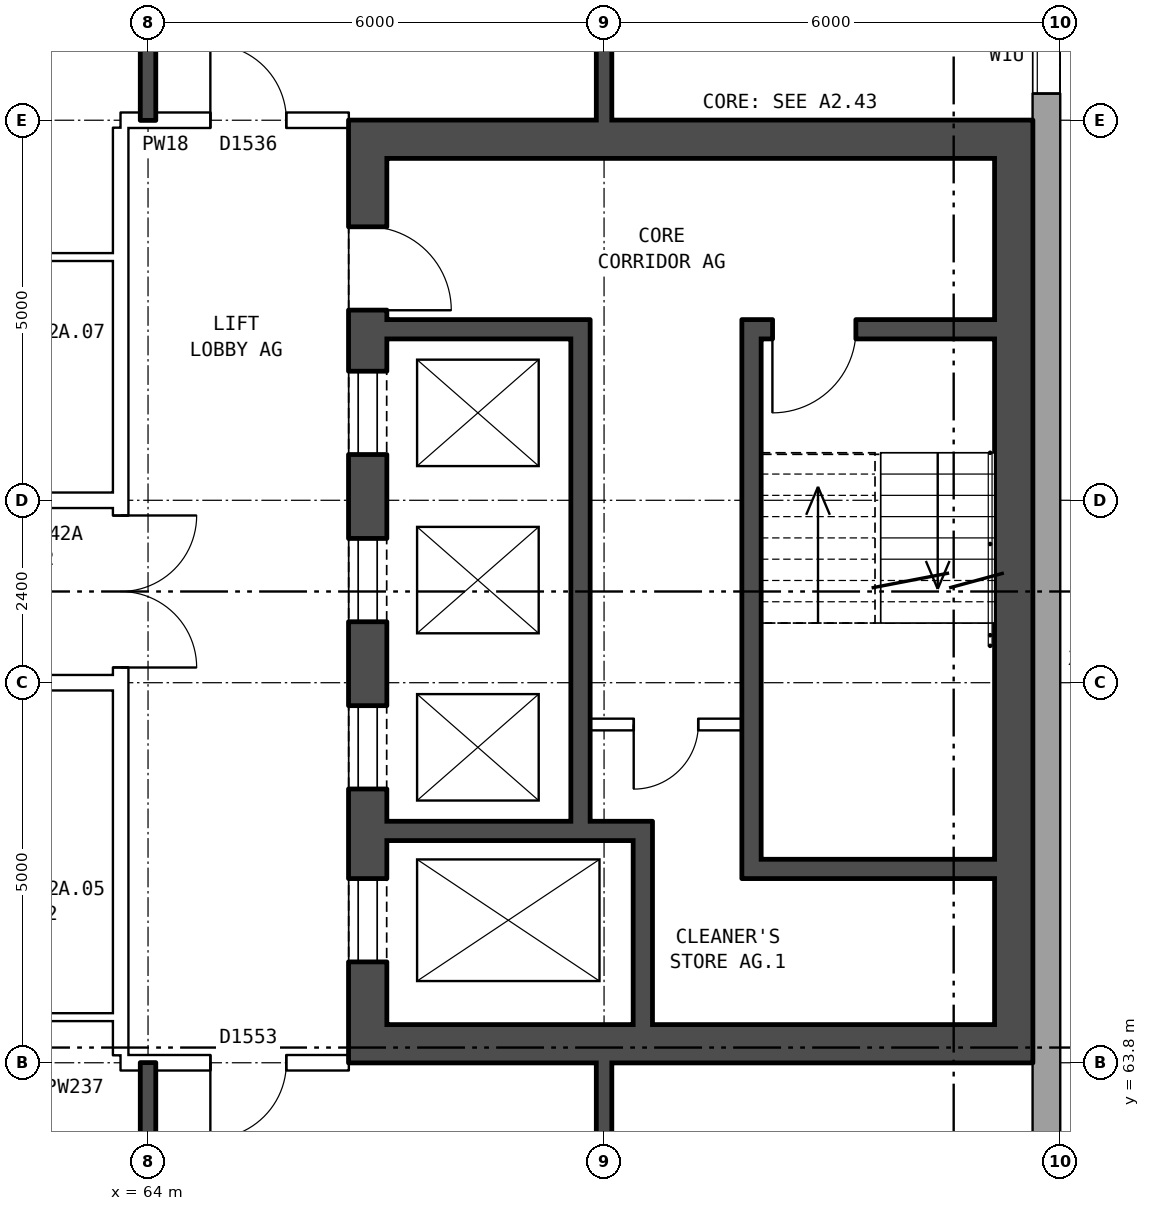
"""IFC4 building model, lengths in metres.
Left out: names, types, materials, properties, quantities, classifications, styles, units other than length and angle.
Written with IfcOpenShell. Run it as: python <this file> out.ifc"""

import sys

from ifc_helpers import new_model, si_unit, direction, frame, frame_2d, origin, place, context, subcontext, project, spatial, rectangle, extrude, element, fill, save


model = new_model("IFC4")
c1 = context("Model", 3, precision=1e-05, world=origin(), true_north=direction((0.0, 1.0)))
c2 = subcontext(c1, "Body", "Model", "MODEL_VIEW")
j1 = project(units=[si_unit("LENGTHUNIT", "METRE"), si_unit("PLANEANGLEUNIT", "RADIAN")], contexts=[c1])
p1 = place(None, origin())
s1 = spatial("IfcSite", under=j1, at=p1, CompositionType="ELEMENT")
p2 = place(p1, origin())
s2 = spatial("IfcBuilding", under=s1, at=p2, CompositionType="ELEMENT")
p3 = place(p2, frame((0.0, 0.0, 151.6)))
s3 = spatial("IfcBuildingStorey", under=s2, at=p3, CompositionType="ELEMENT", Elevation=151.6)
p4 = place(p3, frame((75.82, 57.075, 0.0), z_axis=(0.0, 0.0, 1.0), x_axis=(0.0, 1.0, 0.0)))
e1 = element("IfcWall", 1, at=p4, inside=s3, PredefinedType="STANDARD", context=c2, shape_type="SweptSolid", body=[
    extrude(rectangle(XDim=25.851, YDim=0.36, at=frame_2d((12.925, 0.0))), origin(), (0.0, 0.0, 1.0), 2.85),
])
p5 = place(p4, frame((1.625, 0.0, 0.8)))
e2 = element("IfcOpeningElement", 2, at=p5, cuts=e1, PredefinedType="OPENING", context=c2, shape_type="SweptSolid", body=[
    extrude(rectangle(XDim=1.6, YDim=1.8, at=frame_2d((0.8, 0.9))), frame((0.0, 0.19, 0.0), z_axis=(0.0, -1.0, 0.0), x_axis=(1.0, 0.0, 0.0)), (0.0, 0.0, 1.0), 0.38),
])
p6 = place(p4, frame((3.525, 0.0, 1.7)))
e3 = element("IfcOpeningElement", 3, at=p6, cuts=e1, PredefinedType="OPENING", context=c2, shape_type="SweptSolid", body=[
    extrude(rectangle(XDim=1.6, YDim=0.9, at=frame_2d((0.8, 0.45))), frame((0.0, 0.19, 0.0), z_axis=(0.0, -1.0, 0.0), x_axis=(1.0, 0.0, 0.0)), (0.0, 0.0, 1.0), 0.38),
])
p7 = place(p4, frame((19.475, 0.0, 0.35)))
e4 = element("IfcOpeningElement", 4, at=p7, cuts=e1, PredefinedType="OPENING", context=c2, shape_type="SweptSolid", body=[
    extrude(rectangle(XDim=1.0, YDim=0.9, at=frame_2d((0.5, 0.45))), frame((0.0, 0.19, 0.0), z_axis=(0.0, -1.0, 0.0), x_axis=(1.0, 0.0, 0.0)), (0.0, 0.0, 1.0), 0.38),
])
p8 = place(p4, frame((22.625, 0.0, 0.8)))
e5 = element("IfcOpeningElement", 5, at=p8, cuts=e1, PredefinedType="OPENING", context=c2, shape_type="SweptSolid", body=[
    extrude(rectangle(XDim=1.6, YDim=1.8, at=frame_2d((0.8, 0.9))), frame((0.0, 0.19, 0.0), z_axis=(0.0, -1.0, 0.0), x_axis=(1.0, 0.0, 0.0)), (0.0, 0.0, 1.0), 0.38),
])
p9 = place(p4, frame((20.825, 0.0, 1.65)))
e6 = element("IfcOpeningElement", 6, at=p9, cuts=e1, PredefinedType="OPENING", context=c2, shape_type="SweptSolid", body=[
    extrude(rectangle(XDim=0.8, YDim=0.9, at=frame_2d((0.4, 0.45))), frame((0.0, 0.19, 0.0), z_axis=(0.0, -1.0, 0.0), x_axis=(1.0, 0.0, 0.0)), (0.0, 0.0, 1.0), 0.38),
])
p10 = place(p3, frame((66.89, 63.8, 0.0), z_axis=(0.0, 0.0, 1.0), x_axis=(0.0, 1.0, 0.0)))
e7 = element("IfcWall", 7, at=p10, inside=s3, PredefinedType="SHEAR", context=c2, shape_type="SweptSolid", body=[
    extrude(rectangle(XDim=12.4, YDim=0.5, at=frame_2d((6.2, 0.0))), origin(), (0.0, 0.0, 1.0), 2.85),
])
p11 = place(p10, frame((1.325, 0.0, 0.0)))
e8 = element("IfcOpeningElement", 8, at=p11, cuts=e7, PredefinedType="OPENING", context=c2, shape_type="SweptSolid", body=[
    extrude(rectangle(XDim=1.1, YDim=2.1, at=frame_2d((0.55, 1.05))), frame((0.0, 0.26, 0.0), z_axis=(0.0, -1.0, 0.0), x_axis=(1.0, 0.0, 0.0)), (0.0, 0.0, 1.0), 0.52),
])
p12 = place(p10, frame((3.6, 0.0, 0.0)))
e9 = element("IfcOpeningElement", 9, at=p12, cuts=e7, PredefinedType="OPENING", context=c2, shape_type="SweptSolid", body=[
    extrude(rectangle(XDim=1.1, YDim=2.1, at=frame_2d((0.55, 1.05))), frame((0.0, 0.26, 0.0), z_axis=(0.0, -1.0, 0.0), x_axis=(1.0, 0.0, 0.0)), (0.0, 0.0, 1.0), 0.52),
])
p13 = place(p10, frame((5.8, 0.0, 0.0)))
e10 = element("IfcOpeningElement", 10, at=p13, cuts=e7, PredefinedType="OPENING", context=c2, shape_type="SweptSolid", body=[
    extrude(rectangle(XDim=1.1, YDim=2.1, at=frame_2d((0.55, 1.05))), frame((0.0, 0.26, 0.0), z_axis=(0.0, -1.0, 0.0), x_axis=(1.0, 0.0, 0.0)), (0.0, 0.0, 1.0), 0.52),
])
p14 = place(p10, frame((8.0, 0.0, 0.0)))
e11 = element("IfcOpeningElement", 11, at=p14, cuts=e7, PredefinedType="OPENING", context=c2, shape_type="SweptSolid", body=[
    extrude(rectangle(XDim=1.1, YDim=2.1, at=frame_2d((0.55, 1.05))), frame((0.0, 0.26, 0.0), z_axis=(0.0, -1.0, 0.0), x_axis=(1.0, 0.0, 0.0)), (0.0, 0.0, 1.0), 0.52),
])
p15 = place(p10, frame((9.9, 0.0, 0.0)))
e12 = element("IfcOpeningElement", 12, at=p15, cuts=e7, PredefinedType="OPENING", context=c2, shape_type="SweptSolid", body=[
    extrude(rectangle(XDim=1.1, YDim=2.1, at=frame_2d((0.55, 1.05))), frame((0.0, 0.26, 0.0), z_axis=(0.0, -1.0, 0.0), x_axis=(1.0, 0.0, 0.0)), (0.0, 0.0, 1.0), 0.52),
])
p16 = place(p3, frame((75.39, 63.8, 0.0), z_axis=(0.0, 0.0, 1.0), x_axis=(0.0, 1.0, 0.0)))
e13 = element("IfcWall", 13, at=p16, inside=s3, PredefinedType="SHEAR", context=c2, shape_type="SweptSolid", body=[
    extrude(rectangle(XDim=12.4, YDim=0.5, at=frame_2d((6.2, 0.0))), origin(), (0.0, 0.0, 1.0), 2.85),
])
for number, where, z_axis, x_axis in (
    (14, (67.14, 64.05, 0.0), (0.0, 0.0, 1.0), (1.0, 0.0, 0.0)),
    (15, (67.14, 75.95, 0.0), (0.0, 0.0, 1.0), (1.0, 0.0, 0.0)),
):
    element("IfcWall", number, at=place(p3, frame(where, z_axis=z_axis, x_axis=x_axis)), inside=s3, PredefinedType="SHEAR", context=c2, shape_type="SweptSolid", body=[
        extrude(rectangle(XDim=8.0, YDim=0.5, at=frame_2d((4.0, 0.0))), origin(), (0.0, 0.0, 1.0), 2.85),
    ])
p17 = place(p3, frame((72.065, 66.35, 0.0), z_axis=(0.0, 0.0, 1.0), x_axis=(1.0, 0.0, 0.0)))
e16 = element("IfcWall", 16, at=p17, inside=s3, PredefinedType="SHEAR", context=c2, shape_type="SweptSolid", body=[
    extrude(rectangle(XDim=3.075, YDim=0.25, at=frame_2d((1.538, 0.0))), origin(), (0.0, 0.0, 1.0), 2.85),
])
p18 = place(p3, frame((67.14, 66.85, 0.0), z_axis=(0.0, 0.0, 1.0), x_axis=(1.0, 0.0, 0.0)))
e17 = element("IfcWall", 17, at=p18, inside=s3, PredefinedType="SHEAR", context=c2, shape_type="SweptSolid", body=[
    extrude(rectangle(XDim=3.495, YDim=0.25, at=frame_2d((1.748, 0.0))), origin(), (0.0, 0.0, 1.0), 2.85),
])
p19 = place(p3, frame((69.815, 68.25, 0.0), z_axis=(0.0, 0.0, 1.0), x_axis=(1.0, 0.0, 0.0)))
e18 = element("IfcWall", 18, at=p19, inside=s3, PredefinedType="PARTITIONING", context=c2, shape_type="SweptSolid", body=[
    extrude(rectangle(XDim=2.0, YDim=0.15, at=frame_2d((1.0, 0.0))), origin(), (0.0, 0.0, 1.0), 2.85),
])
p20 = place(p19, frame((0.575, 0.0, 0.0)))
e19 = element("IfcOpeningElement", 19, at=p20, cuts=e18, PredefinedType="OPENING", context=c2, shape_type="SweptSolid", body=[
    extrude(rectangle(XDim=0.85, YDim=2.1, at=frame_2d((0.425, 1.05))), frame((0.0, 0.085, 0.0), z_axis=(0.0, -1.0, 0.0), x_axis=(1.0, 0.0, 0.0)), (0.0, 0.0, 1.0), 0.17),
])
p21 = place(p3, frame((67.14, 73.45, 0.0), z_axis=(0.0, 0.0, 1.0), x_axis=(1.0, 0.0, 0.0)))
e20 = element("IfcWall", 20, at=p21, inside=s3, PredefinedType="SHEAR", context=c2, shape_type="SweptSolid", body=[
    extrude(rectangle(XDim=2.425, YDim=0.25, at=frame_2d((1.212, 0.0))), origin(), (0.0, 0.0, 1.0), 2.85),
])
p22 = place(p3, frame((72.065, 73.45, 0.0), z_axis=(0.0, 0.0, 1.0), x_axis=(1.0, 0.0, 0.0)))
e21 = element("IfcWall", 21, at=p22, inside=s3, PredefinedType="SHEAR", context=c2, shape_type="SweptSolid", body=[
    extrude(rectangle(XDim=3.075, YDim=0.25, at=frame_2d((1.538, 0.0))), origin(), (0.0, 0.0, 1.0), 2.85),
])
p23 = place(p22, frame((0.15, 0.0, 0.0)))
e22 = element("IfcOpeningElement", 22, at=p23, cuts=e21, PredefinedType="OPENING", context=c2, shape_type="SweptSolid", body=[
    extrude(rectangle(XDim=1.1, YDim=2.1, at=frame_2d((0.55, 1.05))), frame((0.0, 0.135, 0.0), z_axis=(0.0, -1.0, 0.0), x_axis=(1.0, 0.0, 0.0)), (0.0, 0.0, 1.0), 0.27),
])
p24 = place(p3, frame((69.69, 66.975, 0.0), z_axis=(0.0, 0.0, 1.0), x_axis=(0.0, 1.0, 0.0)))
e23 = element("IfcWall", 23, at=p24, inside=s3, PredefinedType="SHEAR", context=c2, shape_type="SweptSolid", body=[
    extrude(rectangle(XDim=6.6, YDim=0.25, at=frame_2d((3.3, 0.0))), origin(), (0.0, 0.0, 1.0), 2.85),
])
p25 = place(p3, frame((70.51, 64.3, 0.0), z_axis=(0.0, 0.0, 1.0), x_axis=(0.0, 1.0, 0.0)))
e24 = element("IfcWall", 24, at=p25, inside=s3, PredefinedType="SHEAR", context=c2, shape_type="SweptSolid", body=[
    extrude(rectangle(XDim=2.425, YDim=0.25, at=frame_2d((1.212, 0.0))), origin(), (0.0, 0.0, 1.0), 2.85),
])
p26 = place(p3, frame((71.94, 66.225, 0.0), z_axis=(0.0, 0.0, 1.0), x_axis=(0.0, 1.0, 0.0)))
e25 = element("IfcWall", 25, at=p26, inside=s3, PredefinedType="SHEAR", context=c2, shape_type="SweptSolid", body=[
    extrude(rectangle(XDim=7.35, YDim=0.25, at=frame_2d((3.675, 0.0))), origin(), (0.0, 0.0, 1.0), 2.85),
])
p27 = place(p3, frame((63.64, 63.9, 0.0), z_axis=(0.0, 0.0, 1.0), x_axis=(0.0, 1.0, 0.0)))
e26 = element("IfcWall", 26, at=p27, inside=s3, PredefinedType="PARTITIONING", context=c2, shape_type="SweptSolid", body=[
    extrude(rectangle(XDim=12.2, YDim=0.2, at=frame_2d((6.1, 0.0))), origin(), (0.0, 0.0, 1.0), 2.85),
])
p28 = place(p27, frame((5.1, 0.0, 0.0)))
e27 = element("IfcOpeningElement", 27, at=p28, cuts=e26, PredefinedType="OPENING", context=c2, shape_type="SweptSolid", body=[
    extrude(rectangle(XDim=2.0, YDim=2.1, at=frame_2d((1.0, 1.05))), frame((0.0, 0.11, 0.0), z_axis=(0.0, -1.0, 0.0), x_axis=(1.0, 0.0, 0.0)), (0.0, 0.0, 1.0), 0.22),
])
p29 = place(p3, frame((63.64, 63.8, 0.0), z_axis=(0.0, 0.0, 1.0), x_axis=(1.0, 0.0, 0.0)))
e28 = element("IfcWall", 28, at=p29, inside=s3, PredefinedType="PARTITIONING", context=c2, shape_type="SweptSolid", body=[
    extrude(rectangle(XDim=3.0, YDim=0.2, at=frame_2d((1.5, 0.0))), origin(), (0.0, 0.0, 1.0), 2.85),
])
p30 = place(p29, frame((1.18, 0.0, 0.0)))
e29 = element("IfcOpeningElement", 29, at=p30, cuts=e28, PredefinedType="OPENING", context=c2, shape_type="SweptSolid", body=[
    extrude(rectangle(XDim=1.0, YDim=2.1, at=frame_2d((0.5, 1.05))), frame((0.0, 0.11, 0.0), z_axis=(0.0, -1.0, 0.0), x_axis=(1.0, 0.0, 0.0)), (0.0, 0.0, 1.0), 0.22),
])
p31 = place(p3, frame((61.0, 64.4, 0.0), z_axis=(0.0, 0.0, 1.0), x_axis=(1.0, 0.0, 0.0)))
e30 = element("IfcWall", 30, at=p31, inside=s3, PredefinedType="PARTITIONING", context=c2, shape_type="SweptSolid", body=[
    extrude(rectangle(XDim=2.64, YDim=0.1, at=frame_2d((1.32, 0.0))), origin(), (0.0, 0.0, 1.0), 2.85),
])
p32 = place(p3, frame((44.36, 68.8, 0.0), z_axis=(0.0, 0.0, 1.0), x_axis=(1.0, 0.0, 0.0)))
e31 = element("IfcWall", 31, at=p32, inside=s3, PredefinedType="PARTITIONING", context=c2, shape_type="SweptSolid", body=[
    extrude(rectangle(XDim=19.28, YDim=0.2, at=frame_2d((9.64, 0.0))), origin(), (0.0, 0.0, 1.0), 2.85),
])
p33 = place(p32, frame((14.64, 0.0, 0.0)))
e32 = element("IfcOpeningElement", 32, at=p33, cuts=e31, PredefinedType="OPENING", context=c2, shape_type="SweptSolid", body=[
    extrude(rectangle(XDim=1.0, YDim=2.1, at=frame_2d((0.5, 1.05))), frame((0.0, 0.11, 0.0), z_axis=(0.0, -1.0, 0.0), x_axis=(1.0, 0.0, 0.0)), (0.0, 0.0, 1.0), 0.22),
])
p34 = place(p32, frame((5.64, 0.0, 0.0)))
e33 = element("IfcOpeningElement", 33, at=p34, cuts=e31, PredefinedType="OPENING", context=c2, shape_type="SweptSolid", body=[
    extrude(rectangle(XDim=1.0, YDim=2.1, at=frame_2d((0.5, 1.05))), frame((0.0, 0.11, 0.0), z_axis=(0.0, -1.0, 0.0), x_axis=(1.0, 0.0, 0.0)), (0.0, 0.0, 1.0), 0.22),
])
p35 = place(p3, frame((44.36, 71.2, 0.0), z_axis=(0.0, 0.0, 1.0), x_axis=(1.0, 0.0, 0.0)))
e34 = element("IfcWall", 34, at=p35, inside=s3, PredefinedType="PARTITIONING", context=c2, shape_type="SweptSolid", body=[
    extrude(rectangle(XDim=19.28, YDim=0.2, at=frame_2d((9.64, 0.0))), origin(), (0.0, 0.0, 1.0), 2.85),
])
p36 = place(p35, frame((14.64, 0.0, 0.0)))
e35 = element("IfcOpeningElement", 35, at=p36, cuts=e34, PredefinedType="OPENING", context=c2, shape_type="SweptSolid", body=[
    extrude(rectangle(XDim=1.0, YDim=2.1, at=frame_2d((0.5, 1.05))), frame((0.0, 0.11, 0.0), z_axis=(0.0, -1.0, 0.0), x_axis=(1.0, 0.0, 0.0)), (0.0, 0.0, 1.0), 0.22),
])
p37 = place(p35, frame((5.64, 0.0, 0.0)))
e36 = element("IfcOpeningElement", 36, at=p37, cuts=e34, PredefinedType="OPENING", context=c2, shape_type="SweptSolid", body=[
    extrude(rectangle(XDim=1.0, YDim=2.1, at=frame_2d((0.5, 1.05))), frame((0.0, 0.11, 0.0), z_axis=(0.0, -1.0, 0.0), x_axis=(1.0, 0.0, 0.0)), (0.0, 0.0, 1.0), 0.22),
])
p38 = place(p3, frame((61.0, 74.4, 0.0), z_axis=(0.0, 0.0, 1.0), x_axis=(1.0, 0.0, 0.0)))
e37 = element("IfcWall", 37, at=p38, inside=s3, PredefinedType="PARTITIONING", context=c2, shape_type="SweptSolid", body=[
    extrude(rectangle(XDim=2.64, YDim=0.1, at=frame_2d((1.32, 0.0))), origin(), (0.0, 0.0, 1.0), 2.85),
])
p39 = place(p3, frame((63.64, 76.2, 0.0), z_axis=(0.0, 0.0, 1.0), x_axis=(1.0, 0.0, 0.0)))
e38 = element("IfcWall", 38, at=p39, inside=s3, PredefinedType="PARTITIONING", context=c2, shape_type="SweptSolid", body=[
    extrude(rectangle(XDim=3.0, YDim=0.2, at=frame_2d((1.5, 0.0))), origin(), (0.0, 0.0, 1.0), 2.85),
])
p40 = place(p39, frame((1.18, 0.0, 0.0)))
e39 = element("IfcOpeningElement", 39, at=p40, cuts=e38, PredefinedType="OPENING", context=c2, shape_type="SweptSolid", body=[
    extrude(rectangle(XDim=1.0, YDim=2.1, at=frame_2d((0.5, 1.05))), frame((0.0, 0.11, 0.0), z_axis=(0.0, -1.0, 0.0), x_axis=(1.0, 0.0, 0.0)), (0.0, 0.0, 1.0), 0.22),
])
for number, where, z_axis, x_axis in (
    (40, (64.0, 54.36, 0.0), (0.0, 0.0, 1.0), (0.0, 1.0, 0.0)),
    (41, (64.0, 76.2, 0.0), (0.0, 0.0, 1.0), (0.0, 1.0, 0.0)),
):
    element("IfcWall", number, at=place(p3, frame(where, z_axis=z_axis, x_axis=x_axis)), inside=s3, PredefinedType="SOLIDWALL", context=c2, shape_type="SweptSolid", body=[
        extrude(rectangle(XDim=9.44, YDim=0.2, at=frame_2d((4.72, 0.0))), origin(), (0.0, 0.0, 1.0), 2.85),
    ])
p41 = place(p3, frame((70.0, 54.36, 0.0), z_axis=(0.0, 0.0, 1.0), x_axis=(0.0, 1.0, 0.0)))
e42 = element("IfcWall", 42, at=p41, inside=s3, PredefinedType="SOLIDWALL", context=c2, shape_type="SweptSolid", body=[
    extrude(rectangle(XDim=9.44, YDim=0.2, at=frame_2d((4.72, 0.0))), origin(), (0.0, 0.0, 1.0), 2.85),
])
p42 = place(p41, frame((7.04, 0.0, 0.0)))
e43 = element("IfcOpeningElement", 43, at=p42, cuts=e42, PredefinedType="OPENING", context=c2, shape_type="SweptSolid", body=[
    extrude(rectangle(XDim=0.9, YDim=2.1, at=frame_2d((0.45, 1.05))), frame((0.0, 0.11, 0.0), z_axis=(0.0, -1.0, 0.0), x_axis=(1.0, 0.0, 0.0)), (0.0, 0.0, 1.0), 0.22),
])
p43 = place(p3, frame((70.0, 76.2, 0.0), z_axis=(0.0, 0.0, 1.0), x_axis=(0.0, 1.0, 0.0)))
e44 = element("IfcWall", 44, at=p43, inside=s3, PredefinedType="SOLIDWALL", context=c2, shape_type="SweptSolid", body=[
    extrude(rectangle(XDim=9.44, YDim=0.2, at=frame_2d((4.72, 0.0))), origin(), (0.0, 0.0, 1.0), 2.85),
])
p44 = place(p43, frame((6.22, 0.0, 0.0)))
e45 = element("IfcOpeningElement", 45, at=p44, cuts=e44, PredefinedType="OPENING", context=c2, shape_type="SweptSolid", body=[
    extrude(rectangle(XDim=0.9, YDim=2.1, at=frame_2d((0.45, 1.05))), frame((0.0, 0.11, 0.0), z_axis=(0.0, -1.0, 0.0), x_axis=(1.0, 0.0, 0.0)), (0.0, 0.0, 1.0), 0.22),
])
p45 = place(p43, frame((0.95, 0.0, 0.0)))
e46 = element("IfcOpeningElement", 46, at=p45, cuts=e44, PredefinedType="OPENING", context=c2, shape_type="SweptSolid", body=[
    extrude(rectangle(XDim=0.9, YDim=2.1, at=frame_2d((0.45, 1.05))), frame((0.0, 0.11, 0.0), z_axis=(0.0, -1.0, 0.0), x_axis=(1.0, 0.0, 0.0)), (0.0, 0.0, 1.0), 0.22),
])
p46 = place(p7, origin())
e47 = element("IfcWindow", 47, at=p46, inside=s3, PartitioningType="SINGLE_PANEL", PredefinedType="WINDOW", context=c2, shape_type="SweptSolid", body=[
    extrude(rectangle(XDim=1.0, YDim=0.9, at=frame_2d((0.5, 0.45))), frame((0.0, 0.15, 0.0), z_axis=(0.0, -1.0, 0.0), x_axis=(1.0, 0.0, 0.0)), (0.0, 0.0, 1.0), 0.06),
])
fill(e4, e47)
p47 = place(p11, origin())
e48 = element("IfcDoor", 48, at=p47, inside=s3, OperationType="DOUBLE_DOOR_SLIDING", PredefinedType="DOOR", context=c2, shape_type="SweptSolid", body=[
    extrude(rectangle(XDim=1.1, YDim=2.1, at=frame_2d((0.55, 1.05))), frame((0.0, -0.185, 0.0), z_axis=(0.0, -1.0, 0.0), x_axis=(1.0, 0.0, 0.0)), (0.0, 0.0, 1.0), 0.05),
])
fill(e8, e48)
p48 = place(p12, origin())
e49 = element("IfcDoor", 49, at=p48, inside=s3, OperationType="DOUBLE_DOOR_SLIDING", PredefinedType="DOOR", context=c2, shape_type="SweptSolid", body=[
    extrude(rectangle(XDim=1.1, YDim=2.1, at=frame_2d((0.55, 1.05))), frame((0.0, -0.185, 0.0), z_axis=(0.0, -1.0, 0.0), x_axis=(1.0, 0.0, 0.0)), (0.0, 0.0, 1.0), 0.05),
])
fill(e9, e49)
p49 = place(p13, origin())
e50 = element("IfcDoor", 50, at=p49, inside=s3, OperationType="DOUBLE_DOOR_SLIDING", PredefinedType="DOOR", context=c2, shape_type="SweptSolid", body=[
    extrude(rectangle(XDim=1.1, YDim=2.1, at=frame_2d((0.55, 1.05))), frame((0.0, -0.185, 0.0), z_axis=(0.0, -1.0, 0.0), x_axis=(1.0, 0.0, 0.0)), (0.0, 0.0, 1.0), 0.05),
])
fill(e10, e50)
p50 = place(p14, origin())
e51 = element("IfcDoor", 51, at=p50, inside=s3, OperationType="DOUBLE_DOOR_SLIDING", PredefinedType="DOOR", context=c2, shape_type="SweptSolid", body=[
    extrude(rectangle(XDim=1.1, YDim=2.1, at=frame_2d((0.55, 1.05))), frame((0.0, -0.185, 0.0), z_axis=(0.0, -1.0, 0.0), x_axis=(1.0, 0.0, 0.0)), (0.0, 0.0, 1.0), 0.05),
])
fill(e11, e51)
p51 = place(p15, frame((1.1, 0.0, 0.0), z_axis=(0.0, 0.0, 1.0), x_axis=(-1.0, 0.0, 0.0)))
e52 = element("IfcDoor", 52, at=p51, inside=s3, OperationType="SINGLE_SWING_RIGHT", PredefinedType="DOOR", context=c2, shape_type="SweptSolid", body=[
    extrude(rectangle(XDim=1.1, YDim=2.1, at=frame_2d((0.55, 1.05))), frame((0.0, 0.235, 0.0), z_axis=(0.0, -1.0, 0.0), x_axis=(1.0, 0.0, 0.0)), (0.0, 0.0, 1.0), 0.05),
])
fill(e12, e52)
p52 = place(p23, frame((1.1, 0.0, 0.0), z_axis=(0.0, 0.0, 1.0), x_axis=(-1.0, 0.0, 0.0)))
e53 = element("IfcDoor", 53, at=p52, inside=s3, OperationType="SINGLE_SWING_RIGHT", PredefinedType="DOOR", context=c2, shape_type="SweptSolid", body=[
    extrude(rectangle(XDim=1.1, YDim=2.1, at=frame_2d((0.55, 1.05))), frame((0.0, 0.025, 0.0), z_axis=(0.0, -1.0, 0.0), x_axis=(1.0, 0.0, 0.0)), (0.0, 0.0, 1.0), 0.05),
])
fill(e22, e53)
p53 = place(p20, frame((0.85, 0.0, 0.0), z_axis=(0.0, 0.0, 1.0), x_axis=(-1.0, 0.0, 0.0)))
e54 = element("IfcDoor", 54, at=p53, inside=s3, OperationType="SINGLE_SWING_RIGHT", PredefinedType="DOOR", context=c2, shape_type="SweptSolid", body=[
    extrude(rectangle(XDim=0.85, YDim=2.1, at=frame_2d((0.425, 1.05))), frame((0.0, 0.025, 0.0), z_axis=(0.0, -1.0, 0.0), x_axis=(1.0, 0.0, 0.0)), (0.0, 0.0, 1.0), 0.05),
])
fill(e19, e54)
p54 = place(p28, frame((2.0, 0.0, 0.0), z_axis=(0.0, 0.0, 1.0), x_axis=(-1.0, 0.0, 0.0)))
e55 = element("IfcDoor", 55, at=p54, inside=s3, OperationType="DOUBLE_DOOR_SINGLE_SWING", PredefinedType="DOOR", context=c2, shape_type="SweptSolid", body=[
    extrude(rectangle(XDim=2.0, YDim=2.1, at=frame_2d((1.0, 1.05))), frame((0.0, 0.025, 0.0), z_axis=(0.0, -1.0, 0.0), x_axis=(1.0, 0.0, 0.0)), (0.0, 0.0, 1.0), 0.05),
])
fill(e27, e55)
p55 = place(p30, frame((1.0, 0.0, 0.0), z_axis=(0.0, 0.0, 1.0), x_axis=(-1.0, 0.0, 0.0)))
e56 = element("IfcDoor", 56, at=p55, inside=s3, OperationType="SINGLE_SWING_RIGHT", PredefinedType="DOOR", context=c2, shape_type="SweptSolid", body=[
    extrude(rectangle(XDim=1.0, YDim=2.1, at=frame_2d((0.5, 1.05))), frame((0.0, 0.025, 0.0), z_axis=(0.0, -1.0, 0.0), x_axis=(1.0, 0.0, 0.0)), (0.0, 0.0, 1.0), 0.05),
])
fill(e29, e56)
p56 = place(p40, origin())
e57 = element("IfcDoor", 57, at=p56, inside=s3, OperationType="SINGLE_SWING_LEFT", PredefinedType="DOOR", context=c2, shape_type="SweptSolid", body=[
    extrude(rectangle(XDim=1.0, YDim=2.1, at=frame_2d((0.5, 1.05))), frame((0.0, 0.025, 0.0), z_axis=(0.0, -1.0, 0.0), x_axis=(1.0, 0.0, 0.0)), (0.0, 0.0, 1.0), 0.05),
])
fill(e39, e57)
save(model, sys.argv[1])
